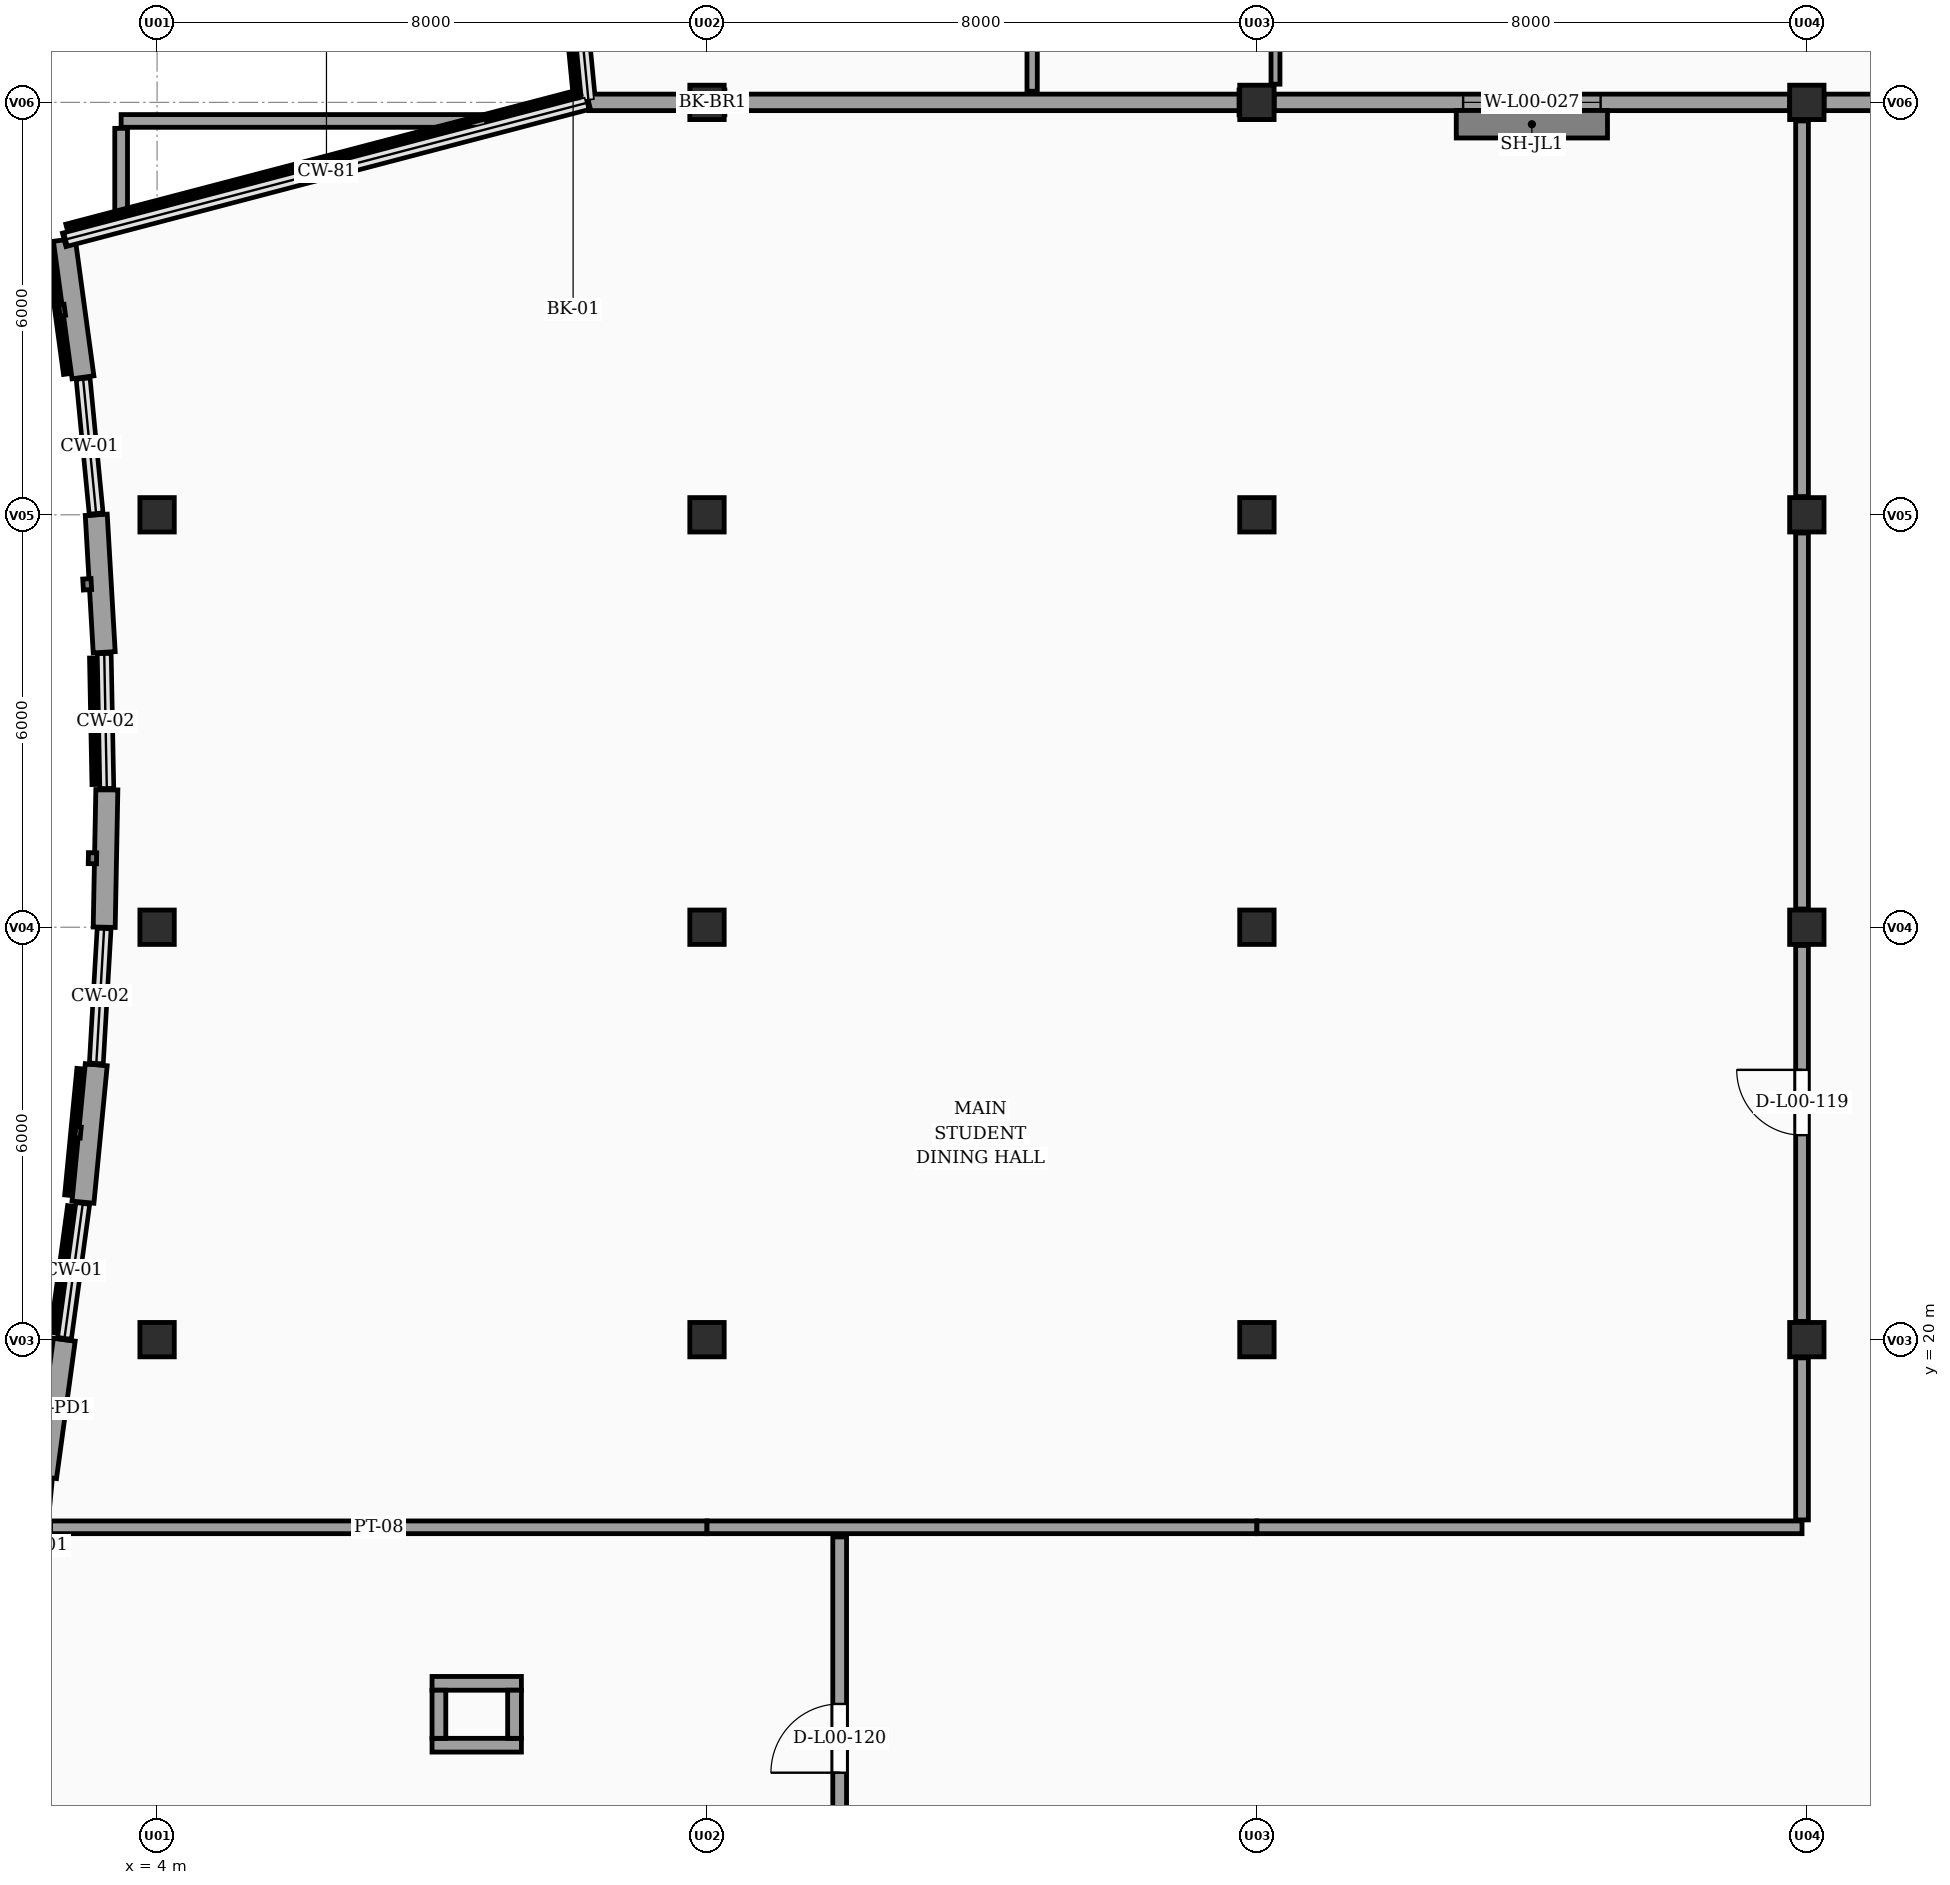
"""IFC4 building model, lengths in metres.
Left out: names, types, materials, properties, quantities, classifications, styles, units other than length and angle.
Written with IfcOpenShell. Run it as: python <this file> out.ifc"""

import sys

from ifc_helpers import new_model, si_unit, direction, frame, frame_2d, origin, origin_2d, place, context, subcontext, project, spatial, rectangle, extrude, element, fill, save


model = new_model("IFC4")
c1 = context("Model", 3, precision=1e-05, world=origin(), true_north=direction((0.0, 1.0)))
c2 = subcontext(c1, "Body", "Model", "MODEL_VIEW")
j1 = project(units=[si_unit("LENGTHUNIT", "METRE"), si_unit("PLANEANGLEUNIT", "RADIAN")], contexts=[c1])
p1 = place(None, origin())
s1 = spatial("IfcSite", under=j1, at=p1, CompositionType="ELEMENT")
p2 = place(p1, origin())
s2 = spatial("IfcBuilding", under=s1, at=p2, CompositionType="ELEMENT")
p3 = place(p2, origin())
s3 = spatial("IfcBuildingStorey", under=s2, at=p3, CompositionType="ELEMENT", Elevation=0.0)
for number, where, z_axis, x_axis in (
    (1, (4.0, 20.0, -0.2), (0.0, 0.0, 1.0), (1.0, 0.0, 0.0)),
    (2, (4.0, 26.0, -0.2), (0.0, 0.0, 1.0), (1.0, 0.0, 0.0)),
    (3, (4.0, 32.0, -0.2), (0.0, 0.0, 1.0), (1.0, 0.0, 0.0)),
    (4, (12.0, 20.0, -0.2), (0.0, 0.0, 1.0), (1.0, 0.0, 0.0)),
    (5, (12.0, 26.0, -0.2), (0.0, 0.0, 1.0), (1.0, 0.0, 0.0)),
    (6, (12.0, 32.0, -0.2), (0.0, 0.0, 1.0), (1.0, 0.0, 0.0)),
    (7, (12.0, 38.0, -0.2), (0.0, 0.0, 1.0), (1.0, 0.0, 0.0)),
    (8, (20.0, 20.0, -0.2), (0.0, 0.0, 1.0), (1.0, 0.0, 0.0)),
    (9, (20.0, 26.0, -0.2), (0.0, 0.0, 1.0), (1.0, 0.0, 0.0)),
    (10, (20.0, 32.0, -0.2), (0.0, 0.0, 1.0), (1.0, 0.0, 0.0)),
    (11, (20.0, 38.0, -0.2), (0.0, 0.0, 1.0), (1.0, 0.0, 0.0)),
    (12, (28.0, 20.0, -0.2), (0.0, 0.0, 1.0), (1.0, 0.0, 0.0)),
    (13, (28.0, 26.0, -0.2), (0.0, 0.0, 1.0), (1.0, 0.0, 0.0)),
    (14, (28.0, 32.0, -0.2), (0.0, 0.0, 1.0), (1.0, 0.0, 0.0)),
    (15, (28.0, 38.0, -0.2), (0.0, 0.0, 1.0), (1.0, 0.0, 0.0)),
):
    element("IfcColumn", number, at=place(p3, frame(where, z_axis=z_axis, x_axis=x_axis)), inside=s3, PredefinedType="COLUMN", context=c2, shape_type="SweptSolid", body=[
        extrude(rectangle(XDim=0.5, YDim=0.5, at=origin_2d()), origin(), (0.0, 0.0, 1.0), 4.7),
    ])
p4 = place(p3, frame((10.278, 38.0, 0.0), z_axis=(0.0, 0.0, 1.0), x_axis=(-0.09623099978, 0.99535902803, 0.0)))
e16 = element("IfcWall", 16, at=p4, inside=s3, PredefinedType="SOLIDWALL", context=c2, shape_type="SweptSolid", body=[
    extrude(rectangle(XDim=2.009, YDim=0.2, at=frame_2d((1.005, 0.0))), origin(), (0.0, 0.0, 1.0), 0.95),
])
p5 = place(p3, frame((35.75, 38.0, 0.0), z_axis=(0.0, 0.0, 1.0), x_axis=(-1.0, 0.0, 0.0)))
e17 = element("IfcWall", 17, at=p5, inside=s3, PredefinedType="SOLIDWALL", context=c2, shape_type="SweptSolid", body=[
    extrude(rectangle(XDim=7.5, YDim=0.24, at=frame_2d((3.75, 0.0))), origin(), (0.0, 0.0, 1.0), 3.59),
])
p6 = place(p5, frame((2.9, 0.0, 0.95)))
e18 = element("IfcOpeningElement", 18, at=p6, cuts=e17, PredefinedType="OPENING", context=c2, shape_type="SweptSolid", body=[
    extrude(rectangle(XDim=1.7, YDim=1.8, at=frame_2d((0.85, 0.9))), frame((0.0, 0.13, 0.0), z_axis=(0.0, -1.0, 0.0), x_axis=(1.0, 0.0, 0.0)), (0.0, 0.0, 1.0), 0.26),
])
p7 = place(p3, frame((27.75, 38.0, 0.0), z_axis=(0.0, 0.0, 1.0), x_axis=(-1.0, 0.0, 0.0)))
e19 = element("IfcWall", 19, at=p7, inside=s3, PredefinedType="SOLIDWALL", context=c2, shape_type="SweptSolid", body=[
    extrude(rectangle(XDim=7.5, YDim=0.24, at=frame_2d((3.75, 0.0))), origin(), (0.0, 0.0, 1.0), 3.59),
])
p8 = place(p7, frame((2.75, 0.0, 0.95)))
e20 = element("IfcOpeningElement", 20, at=p8, cuts=e19, PredefinedType="OPENING", context=c2, shape_type="SweptSolid", body=[
    extrude(rectangle(XDim=2.0, YDim=1.8, at=frame_2d((1.0, 0.9))), frame((0.0, 0.13, 0.0), z_axis=(0.0, -1.0, 0.0), x_axis=(1.0, 0.0, 0.0)), (0.0, 0.0, 1.0), 0.26),
])
p9 = place(p3, frame((19.75, 38.0, 0.0), z_axis=(0.0, 0.0, 1.0), x_axis=(-1.0, 0.0, 0.0)))
e21 = element("IfcWall", 21, at=p9, inside=s3, PredefinedType="SOLIDWALL", context=c2, shape_type="SweptSolid", body=[
    extrude(rectangle(XDim=7.5, YDim=0.24, at=frame_2d((3.75, 0.0))), origin(), (0.0, 0.0, 1.0), 3.59),
])
p10 = place(p3, frame((11.75, 38.0, 0.0), z_axis=(0.0, 0.0, 1.0), x_axis=(-1.0, 0.0, 0.0)))
e22 = element("IfcWall", 22, at=p10, inside=s3, PredefinedType="SOLIDWALL", context=c2, shape_type="SweptSolid", body=[
    extrude(rectangle(XDim=1.472, YDim=0.24, at=frame_2d((0.736, 0.0))), origin(), (0.0, 0.0, 1.0), 3.59),
])
p11 = place(p3, frame((2.185, 16.0, 0.0), z_axis=(0.0, 0.0, 1.0), x_axis=(0.096110619057, 0.995370659053, 0.0)))
e23 = element("IfcWall", 23, at=p11, inside=s3, PredefinedType="SOLIDWALL", context=c2, shape_type="SweptSolid", body=[
    extrude(rectangle(XDim=2.009, YDim=0.2, at=frame_2d((1.005, 0.0))), origin(), (0.0, 0.0, 1.0), 0.95),
])
p12 = place(p3, frame((2.378, 18.0, 0.0), z_axis=(0.0, 0.0, 1.0), x_axis=(0.134627389588, 0.990896294257, 0.0)))
e24 = element("IfcWall", 24, at=p12, inside=s3, PredefinedType="SOLIDWALL", context=c2, shape_type="SweptSolid", body=[
    extrude(rectangle(XDim=2.018, YDim=0.32, at=frame_2d((1.009, 0.0))), origin(), (0.0, 0.0, 1.0), 4.24),
])
p13 = place(p3, frame((2.65, 20.0, 0.0), z_axis=(0.0, 0.0, 1.0), x_axis=(0.134746153381, 0.990880151254, 0.0)))
e25 = element("IfcWall", 25, at=p13, inside=s3, PredefinedType="SOLIDWALL", context=c2, shape_type="SweptSolid", body=[
    extrude(rectangle(XDim=2.018, YDim=0.2, at=frame_2d((1.009, 0.0))), origin(), (0.0, 0.0, 1.0), 0.95),
])
p14 = place(p3, frame((2.922, 22.0, 0.0), z_axis=(0.0, 0.0, 1.0), x_axis=(0.096110619057, 0.995370659053, 0.0)))
e26 = element("IfcWall", 26, at=p14, inside=s3, PredefinedType="SOLIDWALL", context=c2, shape_type="SweptSolid", body=[
    extrude(rectangle(XDim=2.009, YDim=0.32, at=frame_2d((1.005, 0.0))), origin(), (0.0, 0.0, 1.0), 4.24),
])
p15 = place(p3, frame((3.115, 24.0, 0.0), z_axis=(0.0, 0.0, 1.0), x_axis=(0.05776471272, 0.998330224908, 0.0)))
e27 = element("IfcWall", 27, at=p15, inside=s3, PredefinedType="SOLIDWALL", context=c2, shape_type="SweptSolid", body=[
    extrude(rectangle(XDim=2.003, YDim=0.2, at=frame_2d((1.002, 0.0))), origin(), (0.0, 0.0, 1.0), 0.95),
])
p16 = place(p3, frame((3.231, 26.0, 0.0), z_axis=(0.0, 0.0, 1.0), x_axis=(0.019161520385, 0.999816401214, 0.0)))
e28 = element("IfcWall", 28, at=p16, inside=s3, PredefinedType="SOLIDWALL", context=c2, shape_type="SweptSolid", body=[
    extrude(rectangle(XDim=2.0, YDim=0.32, at=frame_2d((1.0, 0.0))), origin(), (0.0, 0.0, 1.0), 4.24),
])
p17 = place(p3, frame((3.269, 28.0, 0.0), z_axis=(0.0, 0.0, 1.0), x_axis=(-0.019161520385, 0.999816401214, 0.0)))
e29 = element("IfcWall", 29, at=p17, inside=s3, PredefinedType="SOLIDWALL", context=c2, shape_type="SweptSolid", body=[
    extrude(rectangle(XDim=2.0, YDim=0.2, at=frame_2d((1.0, 0.0))), origin(), (0.0, 0.0, 1.0), 0.95),
])
p18 = place(p3, frame((3.231, 30.0, 0.0), z_axis=(0.0, 0.0, 1.0), x_axis=(-0.05776471272, 0.998330224908, 0.0)))
e30 = element("IfcWall", 30, at=p18, inside=s3, PredefinedType="SOLIDWALL", context=c2, shape_type="SweptSolid", body=[
    extrude(rectangle(XDim=2.003, YDim=0.32, at=frame_2d((1.002, 0.0))), origin(), (0.0, 0.0, 1.0), 4.24),
])
p19 = place(p3, frame((3.115, 32.0, 0.0), z_axis=(0.0, 0.0, 1.0), x_axis=(-0.096110619057, 0.995370659053, 0.0)))
e31 = element("IfcWall", 31, at=p19, inside=s3, PredefinedType="SOLIDWALL", context=c2, shape_type="SweptSolid", body=[
    extrude(rectangle(XDim=2.009, YDim=0.2, at=frame_2d((1.005, 0.0))), origin(), (0.0, 0.0, 1.0), 0.95),
])
p20 = place(p3, frame((2.922, 34.0, 0.0), z_axis=(0.0, 0.0, 1.0), x_axis=(-0.134746153381, 0.990880151254, 0.0)))
e32 = element("IfcWall", 32, at=p20, inside=s3, PredefinedType="SOLIDWALL", context=c2, shape_type="SweptSolid", body=[
    extrude(rectangle(XDim=2.018, YDim=0.32, at=frame_2d((1.009, 0.0))), origin(), (0.0, 0.0, 1.0), 4.24),
])
p21 = place(p3, frame((2.65, 36.0, 0.0), z_axis=(0.0, 0.0, 1.0), x_axis=(0.967307517152, 0.253606323386, 0.0)))
e33 = element("IfcWall", 33, at=p21, inside=s3, PredefinedType="SOLIDWALL", context=c2, shape_type="SweptSolid", body=[
    extrude(rectangle(XDim=7.886, YDim=0.2, at=frame_2d((3.943, 0.0))), origin(), (0.0, 0.0, 1.0), 0.95),
])
for number, where, z_axis, x_axis in (
    (34, (9.3, 14.1, 0.0), (0.0, 0.0, 1.0), (-1.0, 0.0, 0.0)),
    (35, (8.0, 15.0, 0.0), (0.0, 0.0, 1.0), (1.0, 0.0, 0.0)),
):
    element("IfcWall", number, at=place(p3, frame(where, z_axis=z_axis, x_axis=x_axis)), inside=s3, PredefinedType="PARTITIONING", context=c2, shape_type="SweptSolid", body=[
        extrude(rectangle(XDim=1.3, YDim=0.2, at=frame_2d((0.65, 0.0))), origin(), (0.0, 0.0, 1.0), 4.24),
    ])
for number, where, z_axis, x_axis in (
    (36, (8.1, 14.2, 0.0), (0.0, 0.0, 1.0), (0.0, 1.0, 0.0)),
    (37, (9.2, 14.9, 0.0), (0.0, 0.0, 1.0), (0.0, -1.0, 0.0)),
):
    element("IfcWall", number, at=place(p3, frame(where, z_axis=z_axis, x_axis=x_axis)), inside=s3, PredefinedType="PARTITIONING", context=c2, shape_type="SweptSolid", body=[
        extrude(rectangle(XDim=0.7, YDim=0.2, at=frame_2d((0.35, 0.0))), origin(), (0.0, 0.0, 1.0), 4.24),
    ])
p22 = place(p3, frame((20.27, 38.265, 0.0), z_axis=(0.0, 0.0, 1.0), x_axis=(0.0, 1.0, 0.0)))
e38 = element("IfcWall", 38, at=p22, inside=s3, PredefinedType="PARTITIONING", context=c2, shape_type="SweptSolid", body=[
    extrude(rectangle(XDim=11.47, YDim=0.13, at=frame_2d((5.735, 0.0))), origin(), (0.0, 0.0, 1.0), 3.59),
])
p23 = place(p22, frame((8.225, 0.0, 0.0)))
e39 = element("IfcOpeningElement", 39, at=p23, cuts=e38, PredefinedType="OPENING", context=c2, shape_type="SweptSolid", body=[
    extrude(rectangle(XDim=1.02, YDim=2.1, at=frame_2d((0.51, 1.05))), frame((0.0, 0.075, 0.0), z_axis=(0.0, -1.0, 0.0), x_axis=(1.0, 0.0, 0.0)), (0.0, 0.0, 1.0), 0.15),
])
p24 = place(p3, frame((16.73, 38.162, 0.0), z_axis=(0.0, 0.0, 1.0), x_axis=(0.0, 1.0, 0.0)))
e40 = element("IfcWall", 40, at=p24, inside=s3, PredefinedType="PARTITIONING", context=c2, shape_type="SweptSolid", body=[
    extrude(rectangle(XDim=5.838, YDim=0.15, at=frame_2d((2.919, 0.0))), origin(), (0.0, 0.0, 1.0), 4.24),
])
p25 = place(p3, frame((2.45, 17.27, 0.0), z_axis=(0.0, 0.0, 1.0), x_axis=(1.0, 0.0, 0.0)))
e41 = element("IfcWall", 41, at=p25, inside=s3, PredefinedType="PARTITIONING", context=c2, shape_type="SweptSolid", body=[
    extrude(rectangle(XDim=9.55, YDim=0.185, at=frame_2d((4.775, 0.0))), origin(), (0.0, 0.0, 1.0), 4.24),
])
p26 = place(p3, frame((12.0, 17.27, 0.0), z_axis=(0.0, 0.0, 1.0), x_axis=(1.0, 0.0, 0.0)))
e42 = element("IfcWall", 42, at=p26, inside=s3, PredefinedType="PARTITIONING", context=c2, shape_type="SweptSolid", body=[
    extrude(rectangle(XDim=8.0, YDim=0.185, at=frame_2d((4.0, 0.0))), origin(), (0.0, 0.0, 1.0), 4.24),
])
p27 = place(p3, frame((20.0, 17.27, 0.0), z_axis=(0.0, 0.0, 1.0), x_axis=(1.0, 0.0, 0.0)))
e43 = element("IfcWall", 43, at=p27, inside=s3, PredefinedType="PARTITIONING", context=c2, shape_type="SweptSolid", body=[
    extrude(rectangle(XDim=7.93, YDim=0.185, at=frame_2d((3.965, 0.0))), origin(), (0.0, 0.0, 1.0), 4.24),
])
p28 = place(p3, frame((3.477, 37.73, 0.0), z_axis=(0.0, 0.0, 1.0), x_axis=(1.0, 0.0, 0.0)))
e44 = element("IfcWall", 44, at=p28, inside=s3, PredefinedType="PARTITIONING", context=c2, shape_type="SweptSolid", body=[
    extrude(rectangle(XDim=5.318, YDim=0.185, at=frame_2d((2.659, 0.0))), origin(), (0.0, 0.0, 1.0), 4.24),
])
p29 = place(p3, frame((3.477, 36.336, 0.0), z_axis=(0.0, 0.0, 1.0), x_axis=(0.0, 1.0, 0.0)))
e45 = element("IfcWall", 45, at=p29, inside=s3, PredefinedType="PARTITIONING", context=c2, shape_type="SweptSolid", body=[
    extrude(rectangle(XDim=1.287, YDim=0.185, at=frame_2d((0.644, 0.0))), origin(), (0.0, 0.0, 1.0), 4.24),
])
p30 = place(p3, frame((27.93, 17.377, 0.0), z_axis=(0.0, 0.0, 1.0), x_axis=(0.0, 1.0, 0.0)))
e46 = element("IfcWall", 46, at=p30, inside=s3, PredefinedType="PARTITIONING", context=c2, shape_type="SweptSolid", body=[
    extrude(rectangle(XDim=2.358, YDim=0.185, at=frame_2d((1.179, 0.0))), origin(), (0.0, 0.0, 1.0), 3.59),
])
p31 = place(p3, frame((27.93, 20.265, 0.0), z_axis=(0.0, 0.0, 1.0), x_axis=(0.0, 1.0, 0.0)))
e47 = element("IfcWall", 47, at=p31, inside=s3, PredefinedType="PARTITIONING", context=c2, shape_type="SweptSolid", body=[
    extrude(rectangle(XDim=5.47, YDim=0.185, at=frame_2d((2.735, 0.0))), origin(), (0.0, 0.0, 1.0), 3.59),
])
p32 = place(p31, frame((2.71, 0.0, 0.0)))
e48 = element("IfcOpeningElement", 48, at=p32, cuts=e47, PredefinedType="OPENING", context=c2, shape_type="SweptSolid", body=[
    extrude(rectangle(XDim=0.95, YDim=2.1, at=frame_2d((0.475, 1.05))), frame((0.0, 0.103, 0.0), z_axis=(0.0, -1.0, 0.0), x_axis=(1.0, 0.0, 0.0)), (0.0, 0.0, 1.0), 0.205),
])
p33 = place(p3, frame((27.93, 26.265, 0.0), z_axis=(0.0, 0.0, 1.0), x_axis=(0.0, 1.0, 0.0)))
e49 = element("IfcWall", 49, at=p33, inside=s3, PredefinedType="PARTITIONING", context=c2, shape_type="SweptSolid", body=[
    extrude(rectangle(XDim=5.47, YDim=0.185, at=frame_2d((2.735, 0.0))), origin(), (0.0, 0.0, 1.0), 3.59),
])
p34 = place(p3, frame((27.93, 32.265, 0.0), z_axis=(0.0, 0.0, 1.0), x_axis=(0.0, 1.0, 0.0)))
e50 = element("IfcWall", 50, at=p34, inside=s3, PredefinedType="PARTITIONING", context=c2, shape_type="SweptSolid", body=[
    extrude(rectangle(XDim=5.465, YDim=0.185, at=frame_2d((2.732, 0.0))), origin(), (0.0, 0.0, 1.0), 3.59),
])
p35 = place(p3, frame((13.93, 12.0, 0.0), z_axis=(0.0, 0.0, 1.0), x_axis=(0.0, 1.0, 0.0)))
e51 = element("IfcWall", 51, at=p35, inside=s3, PredefinedType="PARTITIONING", context=c2, shape_type="SweptSolid", body=[
    extrude(rectangle(XDim=5.13, YDim=0.2, at=frame_2d((2.565, 0.0))), origin(), (0.0, 0.0, 1.0), 4.24),
])
p36 = place(p35, frame((1.7, 0.0, 0.0)))
e52 = element("IfcOpeningElement", 52, at=p36, cuts=e51, PredefinedType="OPENING", context=c2, shape_type="SweptSolid", body=[
    extrude(rectangle(XDim=1.0, YDim=2.15, at=frame_2d((0.5, 1.075))), frame((0.0, 0.11, 0.0), z_axis=(0.0, -1.0, 0.0), x_axis=(1.0, 0.0, 0.0)), (0.0, 0.0, 1.0), 0.22),
])
p37 = place(p8, origin())
e53 = element("IfcWindow", 53, at=p37, inside=s3, PartitioningType="DOUBLE_PANEL_VERTICAL", PredefinedType="WINDOW", context=c2, shape_type="SweptSolid", body=[
    extrude(rectangle(XDim=2.0, YDim=1.8, at=frame_2d((1.0, 0.9))), frame((0.0, 0.03, 0.0), z_axis=(0.0, -1.0, 0.0), x_axis=(1.0, 0.0, 0.0)), (0.0, 0.0, 1.0), 0.06),
])
fill(e20, e53)
p38 = place(p32, origin())
e54 = element("IfcDoor", 54, at=p38, inside=s3, OperationType="SINGLE_SWING_RIGHT", PredefinedType="DOOR", context=c2, shape_type="SweptSolid", body=[
    extrude(rectangle(XDim=0.95, YDim=2.1, at=frame_2d((0.475, 1.05))), frame((0.0, 0.025, 0.0), z_axis=(0.0, -1.0, 0.0), x_axis=(1.0, 0.0, 0.0)), (0.0, 0.0, 1.0), 0.05),
])
fill(e48, e54)
p39 = place(p36, origin())
e55 = element("IfcDoor", 55, at=p39, inside=s3, OperationType="SINGLE_SWING_LEFT", PredefinedType="DOOR", context=c2, shape_type="SweptSolid", body=[
    extrude(rectangle(XDim=1.0, YDim=2.15, at=frame_2d((0.5, 1.075))), frame((0.0, 0.025, 0.0), z_axis=(0.0, -1.0, 0.0), x_axis=(1.0, 0.0, 0.0)), (0.0, 0.0, 1.0), 0.05),
])
fill(e52, e55)
save(model, sys.argv[1])
